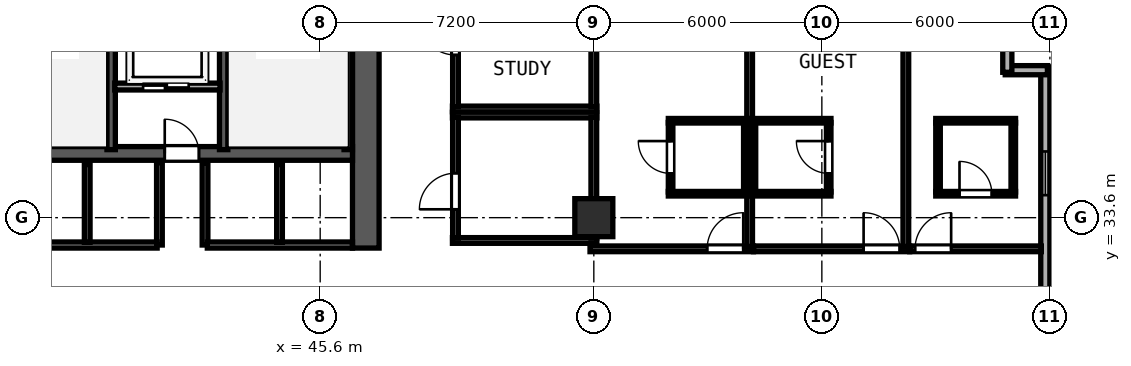
"""IFC4 building model, lengths in metres.
Left out: names, types, materials, properties, quantities, classifications, styles, units other than length and angle.
Written with IfcOpenShell. Run it as: python <this file> out.ifc"""

import sys

from ifc_helpers import new_model, si_unit, direction, frame, frame_2d, origin, origin_2d, place, context, subcontext, project, spatial, rectangle, hollow_rectangle, extrude, element, fill, save


model = new_model("IFC4")
c1 = context("Model", 3, precision=1e-05, world=origin(), true_north=direction((0.0, 1.0)))
c2 = subcontext(c1, "Body", "Model", "MODEL_VIEW")
j1 = project(units=[si_unit("LENGTHUNIT", "METRE"), si_unit("PLANEANGLEUNIT", "RADIAN")], contexts=[c1])
p1 = place(None, origin())
s1 = spatial("IfcSite", under=j1, at=p1, CompositionType="ELEMENT")
p2 = place(p1, origin())
s2 = spatial("IfcBuilding", under=s1, at=p2, CompositionType="ELEMENT")
p3 = place(p2, frame((0.0, 0.0, 152.4)))
s3 = spatial("IfcBuildingStorey", under=s2, at=p3, CompositionType="ELEMENT", Elevation=152.4)
p4 = place(p3, frame((46.8, 32.8, 0.0), z_axis=(0.0, 0.0, 1.0), x_axis=(0.0, 1.0, 0.0)))
e1 = element("IfcWall", 1, at=p4, inside=s3, PredefinedType="SHEAR", context=c2, shape_type="SweptSolid", body=[
    extrude(rectangle(XDim=10.05, YDim=0.7, at=frame_2d((5.025, 0.0))), origin(), (0.0, 0.0, 1.0), 3.6),
])
p5 = place(p3, frame((30.35, 35.29, 0.0), z_axis=(0.0, 0.0, 1.0), x_axis=(1.0, 0.0, 0.0)))
e2 = element("IfcWall", 2, at=p5, inside=s3, PredefinedType="SHEAR", context=c2, shape_type="SweptSolid", body=[
    extrude(rectangle(XDim=16.1, YDim=0.36, at=frame_2d((8.05, 0.0))), origin(), (0.0, 0.0, 1.0), 3.6),
])
p6 = place(p5, frame((5.0, 0.0, 0.0), z_axis=(0.0, 0.0, 1.0), x_axis=(-1.0, 0.0, 0.0)))
e3 = element("IfcOpeningElement", 3, at=p6, cuts=e2, PredefinedType="OPENING", context=c2, shape_type="SweptSolid", body=[
    extrude(rectangle(XDim=0.9, YDim=2.1, at=frame_2d((0.45, 1.05))), frame((0.0, 0.19, 0.0), z_axis=(0.0, -1.0, 0.0), x_axis=(1.0, 0.0, 0.0)), (0.0, 0.0, 1.0), 0.38),
])
p7 = place(p5, frame((12.06, 0.0, 0.0), z_axis=(0.0, 0.0, 1.0), x_axis=(-1.0, 0.0, 0.0)))
e4 = element("IfcOpeningElement", 4, at=p7, cuts=e2, PredefinedType="OPENING", context=c2, shape_type="SweptSolid", body=[
    extrude(rectangle(XDim=0.9, YDim=2.1, at=frame_2d((0.45, 1.05))), frame((0.0, 0.19, 0.0), z_axis=(0.0, -1.0, 0.0), x_axis=(1.0, 0.0, 0.0)), (0.0, 0.0, 1.0), 0.38),
])
for number, where, z_axis, x_axis in (
    (5, (40.1, 35.39, 0.0), (0.0, 0.0, 1.0), (0.0, 1.0, 0.0)),
    (6, (43.06, 35.39, 0.0), (0.0, 0.0, 1.0), (0.0, 1.0, 0.0)),
    (7, (46.338, 35.39, 0.0), (0.0, 0.0, 1.0), (0.0, 1.0, 0.0)),
):
    element("IfcWall", number, at=place(p3, frame(where, z_axis=z_axis, x_axis=x_axis)), inside=s3, PredefinedType="SHEAR", context=c2, shape_type="SweptSolid", body=[
        extrude(rectangle(XDim=7.46, YDim=0.22, at=frame_2d((3.73, 0.0))), origin(), (0.0, 0.0, 1.0), 3.6),
    ])
p8 = place(p3, frame((52.8, 33.6, 0.0), z_axis=(0.0, 0.0, 1.0), x_axis=(1.0, 0.0, 0.0)))
e8 = element("IfcColumn", 8, at=p8, inside=s3, PredefinedType="COLUMN", context=c2, shape_type="SweptSolid", body=[
    extrude(hollow_rectangle(XDim=1.0, YDim=1.0, WallThickness=0.038, at=origin_2d()), origin(), (0.0, 0.0, 1.0), 3.8),
])
p9 = place(p3, frame((64.68, 28.092, 0.0), z_axis=(0.0, 0.0, 1.0), x_axis=(0.0, 1.0, 0.0)))
e9 = element("IfcWall", 9, at=p9, inside=s3, PredefinedType="SOLIDWALL", context=c2, shape_type="SweptSolid", body=[
    extrude(rectangle(XDim=9.443, YDim=0.24, at=frame_2d((4.721, 0.0))), origin(), (0.0, 0.0, 1.0), 3.6),
])
p10 = place(p9, frame((0.7, 0.0, 0.85)))
e10 = element("IfcOpeningElement", 10, at=p10, cuts=e9, PredefinedType="OPENING", context=c2, shape_type="SweptSolid", body=[
    extrude(rectangle(XDim=1.15, YDim=1.8, at=frame_2d((0.575, 0.9))), frame((0.0, 0.13, 0.0), z_axis=(0.0, -1.0, 0.0), x_axis=(1.0, 0.0, 0.0)), (0.0, 0.0, 1.0), 0.26),
])
p11 = place(p9, frame((6.1, 0.0, 0.85)))
e11 = element("IfcOpeningElement", 11, at=p11, cuts=e9, PredefinedType="OPENING", context=c2, shape_type="SweptSolid", body=[
    extrude(rectangle(XDim=1.15, YDim=1.8, at=frame_2d((0.575, 0.9))), frame((0.0, 0.13, 0.0), z_axis=(0.0, -1.0, 0.0), x_axis=(1.0, 0.0, 0.0)), (0.0, 0.0, 1.0), 0.26),
])
p12 = place(p3, frame((64.735, 37.48, 0.0), z_axis=(0.0, 0.0, 1.0), x_axis=(-1.0, 0.0, 0.0)))
e12 = element("IfcWall", 12, at=p12, inside=s3, PredefinedType="SOLIDWALL", context=c2, shape_type="SweptSolid", body=[
    extrude(rectangle(XDim=1.11, YDim=0.24, at=frame_2d((0.555, 0.0))), origin(), (0.0, 0.0, 1.0), 3.6),
])
p13 = place(p3, frame((63.68, 37.425, 0.0), z_axis=(0.0, 0.0, 1.0), x_axis=(0.0, 1.0, 0.0)))
e13 = element("IfcWall", 13, at=p13, inside=s3, PredefinedType="SOLIDWALL", context=c2, shape_type="SweptSolid", body=[
    extrude(rectangle(XDim=1.11, YDim=0.24, at=frame_2d((0.555, 0.0))), origin(), (0.0, 0.0, 1.0), 3.6),
])
p14 = place(p3, frame((40.195, 37.05, 0.0), z_axis=(0.0, 0.0, 1.0), x_axis=(1.0, 0.0, 0.0)))
e14 = element("IfcWall", 14, at=p14, inside=s3, PredefinedType="SOLIDWALL", context=c2, shape_type="SweptSolid", body=[
    extrude(rectangle(XDim=2.77, YDim=0.18, at=frame_2d((1.385, 0.0))), origin(), (0.0, 0.0, 1.0), 3.6),
])
p15 = place(p14, frame((1.945, 0.0, 0.0), z_axis=(0.0, 0.0, 1.0), x_axis=(-1.0, 0.0, 0.0)))
e15 = element("IfcOpeningElement", 15, at=p15, cuts=e14, PredefinedType="OPENING", context=c2, shape_type="SweptSolid", body=[
    extrude(rectangle(XDim=1.2, YDim=2.2, at=frame_2d((0.6, 1.1))), frame((0.0, 0.1, 0.0), z_axis=(0.0, -1.0, 0.0), x_axis=(1.0, 0.0, 0.0)), (0.0, 0.0, 1.0), 0.2),
])
for number, where, z_axis, x_axis in (
    (16, (41.37, 32.88, 0.0), (0.0, 0.0, 1.0), (0.0, 1.0, 0.0)),
    (17, (42.57, 32.88, 0.0), (0.0, 0.0, 1.0), (0.0, 1.0, 0.0)),
):
    element("IfcWall", number, at=place(p3, frame(where, z_axis=z_axis, x_axis=x_axis)), inside=s3, PredefinedType="SOLIDWALL", context=c2, shape_type="SweptSolid", body=[
        extrude(rectangle(XDim=2.17, YDim=0.15, at=frame_2d((1.085, 0.0))), origin(), (0.0, 0.0, 1.0), 3.6),
    ])
p16 = place(p3, frame((35.57, 32.88, 0.0), z_axis=(0.0, 0.0, 1.0), x_axis=(1.0, 0.0, 0.0)))
e18 = element("IfcWall", 18, at=p16, inside=s3, PredefinedType="SOLIDWALL", context=c2, shape_type="SweptSolid", body=[
    extrude(rectangle(XDim=5.74, YDim=0.16, at=frame_2d((2.87, 0.0))), origin(), (0.0, 0.0, 1.0), 3.6),
])
p17 = place(p16, frame((1.49, 0.0, 0.0), z_axis=(0.0, 0.0, 1.0), x_axis=(-1.0, 0.0, 0.0)))
e19 = element("IfcOpeningElement", 19, at=p17, cuts=e18, PredefinedType="OPENING", context=c2, shape_type="SweptSolid", body=[
    extrude(rectangle(XDim=0.95, YDim=2.12, at=frame_2d((0.475, 1.06))), frame((0.0, 0.09, 0.0), z_axis=(0.0, -1.0, 0.0), x_axis=(1.0, 0.0, 0.0)), (0.0, 0.0, 1.0), 0.18),
])
p18 = place(p3, frame((42.63, 32.88, 0.0), z_axis=(0.0, 0.0, 1.0), x_axis=(1.0, 0.0, 0.0)))
e20 = element("IfcWall", 20, at=p18, inside=s3, PredefinedType="SOLIDWALL", context=c2, shape_type="SweptSolid", body=[
    extrude(rectangle(XDim=3.82, YDim=0.16, at=frame_2d((1.91, 0.0))), origin(), (0.0, 0.0, 1.0), 3.6),
])
for number, where, z_axis, x_axis in (
    (21, (39.47, 32.95, 0.0), (0.0, 0.0, 1.0), (0.0, 1.0, 0.0)),
    (22, (44.53, 32.95, 0.0), (0.0, 0.0, 1.0), (0.0, 1.0, 0.0)),
):
    element("IfcWall", number, at=place(p3, frame(where, z_axis=z_axis, x_axis=x_axis)), inside=s3, PredefinedType="SOLIDWALL", context=c2, shape_type="SweptSolid", body=[
        extrude(rectangle(XDim=2.05, YDim=0.15, at=frame_2d((1.025, 0.0))), origin(), (0.0, 0.0, 1.0), 3.6),
    ])
for number, where, z_axis, x_axis in (
    (23, (49.08, 36.3, 0.0), (0.0, 0.0, 1.0), (1.0, 0.0, 0.0)),
    (24, (49.08, 33.0, 0.0), (0.0, 0.0, 1.0), (1.0, 0.0, 0.0)),
):
    element("IfcWall", number, at=place(p3, frame(where, z_axis=z_axis, x_axis=x_axis)), inside=s3, PredefinedType="PARTITIONING", context=c2, shape_type="SweptSolid", body=[
        extrude(rectangle(XDim=3.8, YDim=0.15, at=frame_2d((1.9, 0.0))), origin(), (0.0, 0.0, 1.0), 3.6),
    ])
p19 = place(p3, frame((49.16, 33.06, 0.0), z_axis=(0.0, 0.0, 1.0), x_axis=(0.0, 1.0, 0.0)))
e25 = element("IfcWall", 25, at=p19, inside=s3, PredefinedType="PARTITIONING", context=c2, shape_type="SweptSolid", body=[
    extrude(rectangle(XDim=3.18, YDim=0.15, at=frame_2d((1.59, 0.0))), origin(), (0.0, 0.0, 1.0), 3.6),
])
p20 = place(p19, frame((0.76, 0.0, 0.0)))
e26 = element("IfcOpeningElement", 26, at=p20, cuts=e25, PredefinedType="OPENING", context=c2, shape_type="SweptSolid", body=[
    extrude(rectangle(XDim=0.95, YDim=2.12, at=frame_2d((0.475, 1.06))), frame((0.0, 0.085, 0.0), z_axis=(0.0, -1.0, 0.0), x_axis=(1.0, 0.0, 0.0)), (0.0, 0.0, 1.0), 0.17),
])
p21 = place(p3, frame((52.8, 33.06, 0.0), z_axis=(0.0, 0.0, 1.0), x_axis=(0.0, 1.0, 0.0)))
e27 = element("IfcWall", 27, at=p21, inside=s3, PredefinedType="PARTITIONING", context=c2, shape_type="SweptSolid", body=[
    extrude(rectangle(XDim=3.18, YDim=0.15, at=frame_2d((1.59, 0.0))), origin(), (0.0, 0.0, 1.0), 3.145),
])
p22 = place(p3, frame((49.08, 36.46, 0.0), z_axis=(0.0, 0.0, 1.0), x_axis=(1.0, 0.0, 0.0)))
e28 = element("IfcWall", 28, at=p22, inside=s3, PredefinedType="PARTITIONING", context=c2, shape_type="SweptSolid", body=[
    extrude(rectangle(XDim=3.8, YDim=0.15, at=frame_2d((1.9, 0.0))), origin(), (0.0, 0.0, 1.0), 3.6),
])
p23 = place(p3, frame((49.16, 36.52, 0.0), z_axis=(0.0, 0.0, 1.0), x_axis=(0.0, 1.0, 0.0)))
e29 = element("IfcWall", 29, at=p23, inside=s3, PredefinedType="PARTITIONING", context=c2, shape_type="SweptSolid", body=[
    extrude(rectangle(XDim=4.62, YDim=0.15, at=frame_2d((2.31, 0.0))), origin(), (0.0, 0.0, 1.0), 3.6),
])
p24 = place(p23, frame((1.36, 0.0, 0.0)))
e30 = element("IfcOpeningElement", 30, at=p24, cuts=e29, PredefinedType="OPENING", context=c2, shape_type="SweptSolid", body=[
    extrude(rectangle(XDim=0.95, YDim=2.12, at=frame_2d((0.475, 1.06))), frame((0.0, 0.085, 0.0), z_axis=(0.0, -1.0, 0.0), x_axis=(1.0, 0.0, 0.0)), (0.0, 0.0, 1.0), 0.17),
])
p25 = place(p3, frame((52.8, 36.52, 0.0), z_axis=(0.0, 0.0, 1.0), x_axis=(0.0, 1.0, 0.0)))
e31 = element("IfcWall", 31, at=p25, inside=s3, PredefinedType="PARTITIONING", context=c2, shape_type="SweptSolid", body=[
    extrude(rectangle(XDim=4.62, YDim=0.15, at=frame_2d((2.31, 0.0))), origin(), (0.0, 0.0, 1.0), 3.145),
])
p26 = place(p3, frame((52.7, 32.78, 0.0), z_axis=(0.0, 0.0, 1.0), x_axis=(1.0, 0.0, 0.0)))
e32 = element("IfcWall", 32, at=p26, inside=s3, PredefinedType="PARTITIONING", context=c2, shape_type="SweptSolid", body=[
    extrude(rectangle(XDim=4.3, YDim=0.15, at=frame_2d((2.15, 0.0))), origin(), (0.0, 0.0, 1.0), 3.6),
])
p27 = place(p26, frame((3.082, 0.0, 0.0)))
e33 = element("IfcOpeningElement", 33, at=p27, cuts=e32, PredefinedType="OPENING", context=c2, shape_type="SweptSolid", body=[
    extrude(rectangle(XDim=0.95, YDim=2.15, at=frame_2d((0.475, 1.075))), frame((0.0, 0.085, 0.0), z_axis=(0.0, -1.0, 0.0), x_axis=(1.0, 0.0, 0.0)), (0.0, 0.0, 1.0), 0.17),
])
p28 = place(p3, frame((56.9, 32.84, 0.0), z_axis=(0.0, 0.0, 1.0), x_axis=(0.0, 1.0, 0.0)))
e34 = element("IfcWall", 34, at=p28, inside=s3, PredefinedType="PARTITIONING", context=c2, shape_type="SweptSolid", body=[
    extrude(rectangle(XDim=9.956, YDim=0.15, at=frame_2d((4.978, 0.0))), origin(), (0.0, 0.0, 1.0), 3.6),
])
for number, where, z_axis, x_axis in (
    (35, (54.76, 36.15, 0.0), (0.0, 0.0, 1.0), (1.0, 0.0, 0.0)),
    (36, (54.76, 34.23, 0.0), (0.0, 0.0, 1.0), (1.0, 0.0, 0.0)),
):
    element("IfcWall", number, at=place(p3, frame(where, z_axis=z_axis, x_axis=x_axis)), inside=s3, PredefinedType="PARTITIONING", context=c2, shape_type="SweptSolid", body=[
        extrude(rectangle(XDim=2.08, YDim=0.12, at=frame_2d((1.04, 0.0))), origin(), (0.0, 0.0, 1.0), 3.6),
    ])
p29 = place(p3, frame((54.82, 34.275, 0.0), z_axis=(0.0, 0.0, 1.0), x_axis=(0.0, 1.0, 0.0)))
e37 = element("IfcWall", 37, at=p29, inside=s3, PredefinedType="PARTITIONING", context=c2, shape_type="SweptSolid", body=[
    extrude(rectangle(XDim=1.83, YDim=0.12, at=frame_2d((0.915, 0.0))), origin(), (0.0, 0.0, 1.0), 3.6),
])
p30 = place(p29, frame((1.34, 0.0, 0.0), z_axis=(0.0, 0.0, 1.0), x_axis=(-1.0, 0.0, 0.0)))
e38 = element("IfcOpeningElement", 38, at=p30, cuts=e37, PredefinedType="OPENING", context=c2, shape_type="SweptSolid", body=[
    extrude(rectangle(XDim=0.85, YDim=2.1, at=frame_2d((0.425, 1.05))), frame((0.0, 0.07, 0.0), z_axis=(0.0, -1.0, 0.0), x_axis=(1.0, 0.0, 0.0)), (0.0, 0.0, 1.0), 0.14),
])
p31 = place(p3, frame((56.8, 34.275, 0.0), z_axis=(0.0, 0.0, 1.0), x_axis=(0.0, 1.0, 0.0)))
e39 = element("IfcWall", 39, at=p31, inside=s3, PredefinedType="PARTITIONING", context=c2, shape_type="SweptSolid", body=[
    extrude(rectangle(XDim=1.83, YDim=0.12, at=frame_2d((0.915, 0.0))), origin(), (0.0, 0.0, 1.0), 3.6),
])
p32 = place(p3, frame((57.002, 32.78, 0.0), z_axis=(0.0, 0.0, 1.0), x_axis=(1.0, 0.0, 0.0)))
e40 = element("IfcWall", 40, at=p32, inside=s3, PredefinedType="PARTITIONING", context=c2, shape_type="SweptSolid", body=[
    extrude(rectangle(XDim=4.108, YDim=0.15, at=frame_2d((2.054, 0.0))), origin(), (0.0, 0.0, 1.0), 3.6),
])
p33 = place(p32, frame((2.896, 0.0, 0.0)))
e41 = element("IfcOpeningElement", 41, at=p33, cuts=e40, PredefinedType="OPENING", context=c2, shape_type="SweptSolid", body=[
    extrude(rectangle(XDim=0.95, YDim=2.15, at=frame_2d((0.475, 1.075))), frame((0.0, 0.085, 0.0), z_axis=(0.0, -1.0, 0.0), x_axis=(1.0, 0.0, 0.0)), (0.0, 0.0, 1.0), 0.17),
])
p34 = place(p3, frame((61.01, 32.84, 0.0), z_axis=(0.0, 0.0, 1.0), x_axis=(0.0, 1.0, 0.0)))
e42 = element("IfcWall", 42, at=p34, inside=s3, PredefinedType="PARTITIONING", context=c2, shape_type="SweptSolid", body=[
    extrude(rectangle(XDim=7.998, YDim=0.15, at=frame_2d((3.999, 0.0))), origin(), (0.0, 0.0, 1.0), 3.6),
])
for number, where, z_axis, x_axis in (
    (43, (56.96, 36.15, 0.0), (0.0, 0.0, 1.0), (1.0, 0.0, 0.0)),
    (44, (56.96, 34.23, 0.0), (0.0, 0.0, 1.0), (1.0, 0.0, 0.0)),
):
    element("IfcWall", number, at=place(p3, frame(where, z_axis=z_axis, x_axis=x_axis)), inside=s3, PredefinedType="PARTITIONING", context=c2, shape_type="SweptSolid", body=[
        extrude(rectangle(XDim=2.08, YDim=0.12, at=frame_2d((1.04, 0.0))), origin(), (0.0, 0.0, 1.0), 3.6),
    ])
p35 = place(p3, frame((57.0, 34.275, 0.0), z_axis=(0.0, 0.0, 1.0), x_axis=(0.0, 1.0, 0.0)))
e45 = element("IfcWall", 45, at=p35, inside=s3, PredefinedType="PARTITIONING", context=c2, shape_type="SweptSolid", body=[
    extrude(rectangle(XDim=1.83, YDim=0.12, at=frame_2d((0.915, 0.0))), origin(), (0.0, 0.0, 1.0), 3.6),
])
p36 = place(p3, frame((58.98, 34.275, 0.0), z_axis=(0.0, 0.0, 1.0), x_axis=(0.0, 1.0, 0.0)))
e46 = element("IfcWall", 46, at=p36, inside=s3, PredefinedType="PARTITIONING", context=c2, shape_type="SweptSolid", body=[
    extrude(rectangle(XDim=1.83, YDim=0.12, at=frame_2d((0.915, 0.0))), origin(), (0.0, 0.0, 1.0), 3.6),
])
p37 = place(p36, frame((0.49, 0.0, 0.0)))
e47 = element("IfcOpeningElement", 47, at=p37, cuts=e46, PredefinedType="OPENING", context=c2, shape_type="SweptSolid", body=[
    extrude(rectangle(XDim=0.85, YDim=2.1, at=frame_2d((0.425, 1.05))), frame((0.0, 0.07, 0.0), z_axis=(0.0, -1.0, 0.0), x_axis=(1.0, 0.0, 0.0)), (0.0, 0.0, 1.0), 0.14),
])
p38 = place(p3, frame((61.112, 32.78, 0.0), z_axis=(0.0, 0.0, 1.0), x_axis=(1.0, 0.0, 0.0)))
e48 = element("IfcWall", 48, at=p38, inside=s3, PredefinedType="PARTITIONING", context=c2, shape_type="SweptSolid", body=[
    extrude(rectangle(XDim=3.463, YDim=0.15, at=frame_2d((1.731, 0.0))), origin(), (0.0, 0.0, 1.0), 3.6),
])
p39 = place(p38, frame((0.14, 0.0, 0.0)))
e49 = element("IfcOpeningElement", 49, at=p39, cuts=e48, PredefinedType="OPENING", context=c2, shape_type="SweptSolid", body=[
    extrude(rectangle(XDim=0.95, YDim=2.15, at=frame_2d((0.475, 1.075))), frame((0.0, 0.085, 0.0), z_axis=(0.0, -1.0, 0.0), x_axis=(1.0, 0.0, 0.0)), (0.0, 0.0, 1.0), 0.17),
])
p40 = place(p3, frame((61.797, 36.15, 0.0), z_axis=(0.0, 0.0, 1.0), x_axis=(1.0, 0.0, 0.0)))
e50 = element("IfcWall", 50, at=p40, inside=s3, PredefinedType="PARTITIONING", context=c2, shape_type="SweptSolid", body=[
    extrude(rectangle(XDim=2.1, YDim=0.12, at=frame_2d((1.05, 0.0))), origin(), (0.0, 0.0, 1.0), 3.6),
])
p41 = place(p3, frame((61.797, 34.23, 0.0), z_axis=(0.0, 0.0, 1.0), x_axis=(1.0, 0.0, 0.0)))
e51 = element("IfcWall", 51, at=p41, inside=s3, PredefinedType="PARTITIONING", context=c2, shape_type="SweptSolid", body=[
    extrude(rectangle(XDim=2.1, YDim=0.12, at=frame_2d((1.05, 0.0))), origin(), (0.0, 0.0, 1.0), 3.6),
])
p42 = place(p41, frame((0.625, 0.0, 0.0)))
e52 = element("IfcOpeningElement", 52, at=p42, cuts=e51, PredefinedType="OPENING", context=c2, shape_type="SweptSolid", body=[
    extrude(rectangle(XDim=0.85, YDim=2.1, at=frame_2d((0.425, 1.05))), frame((0.0, 0.07, 0.0), z_axis=(0.0, -1.0, 0.0), x_axis=(1.0, 0.0, 0.0)), (0.0, 0.0, 1.0), 0.14),
])
for number, where, z_axis, x_axis in (
    (53, (61.857, 34.275, 0.0), (0.0, 0.0, 1.0), (0.0, 1.0, 0.0)),
    (54, (63.837, 34.275, 0.0), (0.0, 0.0, 1.0), (0.0, 1.0, 0.0)),
):
    element("IfcWall", number, at=place(p3, frame(where, z_axis=z_axis, x_axis=x_axis)), inside=s3, PredefinedType="PARTITIONING", context=c2, shape_type="SweptSolid", body=[
        extrude(rectangle(XDim=1.83, YDim=0.12, at=frame_2d((0.915, 0.0))), origin(), (0.0, 0.0, 1.0), 3.6),
    ])
p43 = place(p11, origin())
e55 = element("IfcWindow", 55, at=p43, inside=s3, PartitioningType="SINGLE_PANEL", PredefinedType="WINDOW", context=c2, shape_type="SweptSolid", body=[
    extrude(rectangle(XDim=1.15, YDim=1.8, at=frame_2d((0.575, 0.9))), frame((0.0, 0.03, 0.0), z_axis=(0.0, -1.0, 0.0), x_axis=(1.0, 0.0, 0.0)), (0.0, 0.0, 1.0), 0.06),
])
fill(e11, e55)
p44 = place(p15, origin())
e56 = element("IfcDoor", 56, at=p44, inside=s3, OperationType="SLIDING_TO_RIGHT", PredefinedType="DOOR", context=c2, shape_type="SweptSolid", body=[
    extrude(rectangle(XDim=1.2, YDim=2.2, at=frame_2d((0.6, 1.1))), frame((0.0, 0.025, 0.0), z_axis=(0.0, -1.0, 0.0), x_axis=(1.0, 0.0, 0.0)), (0.0, 0.0, 1.0), 0.05),
])
fill(e15, e56)
p45 = place(p7, origin())
e57 = element("IfcDoor", 57, at=p45, inside=s3, OperationType="SINGLE_SWING_RIGHT", PredefinedType="DOOR", context=c2, shape_type="SweptSolid", body=[
    extrude(rectangle(XDim=0.9, YDim=2.1, at=frame_2d((0.45, 1.05))), frame((0.0, 0.025, 0.0), z_axis=(0.0, -1.0, 0.0), x_axis=(1.0, 0.0, 0.0)), (0.0, 0.0, 1.0), 0.05),
])
fill(e4, e57)
p46 = place(p20, origin())
e58 = element("IfcDoor", 58, at=p46, inside=s3, OperationType="SINGLE_SWING_LEFT", PredefinedType="DOOR", context=c2, shape_type="SweptSolid", body=[
    extrude(rectangle(XDim=0.95, YDim=2.12, at=frame_2d((0.475, 1.06))), frame((0.0, 0.025, 0.0), z_axis=(0.0, -1.0, 0.0), x_axis=(1.0, 0.0, 0.0)), (0.0, 0.0, 1.0), 0.05),
])
fill(e26, e58)
p47 = place(p24, origin())
e59 = element("IfcDoor", 59, at=p47, inside=s3, OperationType="SINGLE_SWING_RIGHT", PredefinedType="DOOR", context=c2, shape_type="SweptSolid", body=[
    extrude(rectangle(XDim=0.95, YDim=2.12, at=frame_2d((0.475, 1.06))), frame((0.0, 0.025, 0.0), z_axis=(0.0, -1.0, 0.0), x_axis=(1.0, 0.0, 0.0)), (0.0, 0.0, 1.0), 0.05),
])
fill(e30, e59)
p48 = place(p27, origin())
e60 = element("IfcDoor", 60, at=p48, inside=s3, OperationType="SINGLE_SWING_RIGHT", PredefinedType="DOOR", context=c2, shape_type="SweptSolid", body=[
    extrude(rectangle(XDim=0.95, YDim=2.15, at=frame_2d((0.475, 1.075))), frame((0.0, 0.025, 0.0), z_axis=(0.0, -1.0, 0.0), x_axis=(1.0, 0.0, 0.0)), (0.0, 0.0, 1.0), 0.05),
])
fill(e33, e60)
p49 = place(p30, origin())
e61 = element("IfcDoor", 61, at=p49, inside=s3, OperationType="SINGLE_SWING_LEFT", PredefinedType="DOOR", context=c2, shape_type="SweptSolid", body=[
    extrude(rectangle(XDim=0.85, YDim=2.1, at=frame_2d((0.425, 1.05))), frame((0.0, 0.025, 0.0), z_axis=(0.0, -1.0, 0.0), x_axis=(1.0, 0.0, 0.0)), (0.0, 0.0, 1.0), 0.05),
])
fill(e38, e61)
p50 = place(p33, origin())
e62 = element("IfcDoor", 62, at=p50, inside=s3, OperationType="SINGLE_SWING_LEFT", PredefinedType="DOOR", context=c2, shape_type="SweptSolid", body=[
    extrude(rectangle(XDim=0.95, YDim=2.15, at=frame_2d((0.475, 1.075))), frame((0.0, 0.025, 0.0), z_axis=(0.0, -1.0, 0.0), x_axis=(1.0, 0.0, 0.0)), (0.0, 0.0, 1.0), 0.05),
])
fill(e41, e62)
p51 = place(p37, origin())
e63 = element("IfcDoor", 63, at=p51, inside=s3, OperationType="SINGLE_SWING_RIGHT", PredefinedType="DOOR", context=c2, shape_type="SweptSolid", body=[
    extrude(rectangle(XDim=0.85, YDim=2.1, at=frame_2d((0.425, 1.05))), frame((0.0, 0.025, 0.0), z_axis=(0.0, -1.0, 0.0), x_axis=(1.0, 0.0, 0.0)), (0.0, 0.0, 1.0), 0.05),
])
fill(e47, e63)
p52 = place(p39, origin())
e64 = element("IfcDoor", 64, at=p52, inside=s3, OperationType="SINGLE_SWING_RIGHT", PredefinedType="DOOR", context=c2, shape_type="SweptSolid", body=[
    extrude(rectangle(XDim=0.95, YDim=2.15, at=frame_2d((0.475, 1.075))), frame((0.0, 0.025, 0.0), z_axis=(0.0, -1.0, 0.0), x_axis=(1.0, 0.0, 0.0)), (0.0, 0.0, 1.0), 0.05),
])
fill(e49, e64)
p53 = place(p42, origin())
e65 = element("IfcDoor", 65, at=p53, inside=s3, OperationType="SINGLE_SWING_LEFT", PredefinedType="DOOR", context=c2, shape_type="SweptSolid", body=[
    extrude(rectangle(XDim=0.85, YDim=2.1, at=frame_2d((0.425, 1.05))), frame((0.0, 0.025, 0.0), z_axis=(0.0, -1.0, 0.0), x_axis=(1.0, 0.0, 0.0)), (0.0, 0.0, 1.0), 0.05),
])
fill(e52, e65)
save(model, sys.argv[1])
